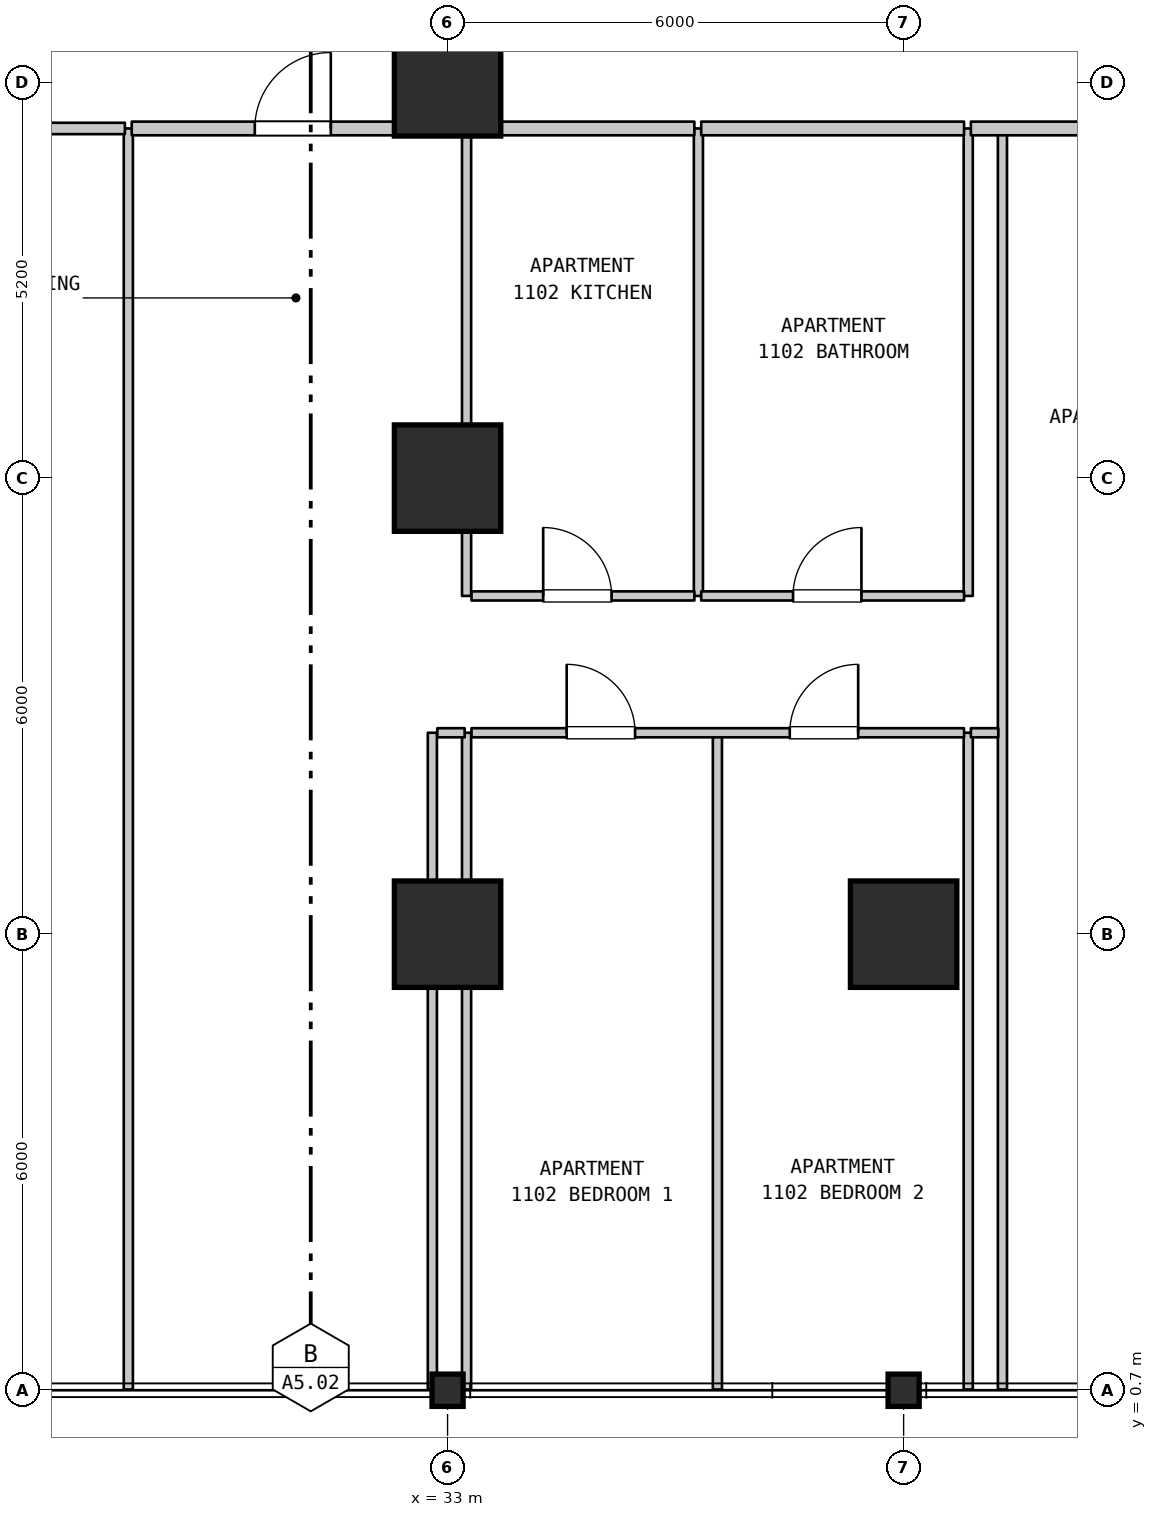
"""IFC4 building model, lengths in metres.
Left out: names, types, materials, properties, quantities, classifications, styles, units other than length and angle.
Written with IfcOpenShell. Run it as: python <this file> out.ifc"""

import sys

from ifc_helpers import new_model, si_unit, direction, frame, frame_2d, origin, origin_2d, place, context, subcontext, project, spatial, rectangle, i_section, extrude, element, fill, save


model = new_model("IFC4")
c1 = context("Model", 3, precision=1e-05, world=origin(), true_north=direction((0.0, 1.0)))
c2 = subcontext(c1, "Body", "Model", "MODEL_VIEW")
j1 = project(units=[si_unit("LENGTHUNIT", "METRE"), si_unit("PLANEANGLEUNIT", "RADIAN")], contexts=[c1])
p1 = place(None, origin())
s1 = spatial("IfcSite", under=j1, at=p1, CompositionType="ELEMENT")
p2 = place(p1, origin())
s2 = spatial("IfcBuilding", under=s1, at=p2, CompositionType="ELEMENT")
p3 = place(p2, frame((0.0, 0.0, 49.9)))
s3 = spatial("IfcBuildingStorey", under=s2, at=p3, CompositionType="ELEMENT", Elevation=49.9)
p4 = place(p3, frame((33.0, 0.7, 0.0), z_axis=(0.0, 0.0, 1.0), x_axis=(1.0, 0.0, 0.0)))
e1 = element("IfcColumn", 1, at=p4, inside=s3, PredefinedType="COLUMN", context=c2, shape_type="SweptSolid", body=[
    extrude(i_section(OverallWidth=0.409, OverallDepth=0.425, WebThickness=0.032, FlangeThickness=0.052, FilletRadius=0.015, at=origin_2d()), origin(), (0.0, 0.0, 1.0), 3.7),
])
for number, where, z_axis, x_axis in (
    (2, (33.0, 6.7, 0.0), (0.0, 0.0, 1.0), (1.0, 0.0, 0.0)),
    (3, (33.0, 12.7, 0.0), (0.0, 0.0, 1.0), (1.0, 0.0, 0.0)),
    (4, (33.0, 17.9, 0.0), (0.0, 0.0, 1.0), (1.0, 0.0, 0.0)),
):
    element("IfcColumn", number, at=place(p3, frame(where, z_axis=z_axis, x_axis=x_axis)), inside=s3, PredefinedType="COLUMN", context=c2, shape_type="SweptSolid", body=[
        extrude(rectangle(XDim=1.4, YDim=1.4, at=origin_2d()), origin(), (0.0, 0.0, 1.0), 3.7),
    ])
p5 = place(p3, frame((39.0, 0.7, 0.0), z_axis=(0.0, 0.0, 1.0), x_axis=(1.0, 0.0, 0.0)))
e5 = element("IfcColumn", 5, at=p5, inside=s3, PredefinedType="COLUMN", context=c2, shape_type="SweptSolid", body=[
    extrude(i_section(OverallWidth=0.409, OverallDepth=0.425, WebThickness=0.032, FlangeThickness=0.052, FilletRadius=0.015, at=origin_2d()), origin(), (0.0, 0.0, 1.0), 3.7),
])
p6 = place(p3, frame((39.0, 6.7, 0.0), z_axis=(0.0, 0.0, 1.0), x_axis=(1.0, 0.0, 0.0)))
e6 = element("IfcColumn", 6, at=p6, inside=s3, PredefinedType="COLUMN", context=c2, shape_type="SweptSolid", body=[
    extrude(rectangle(XDim=1.4, YDim=1.4, at=origin_2d()), origin(), (0.0, 0.0, 1.0), 3.7),
])
p7 = place(p3, frame((28.8, 0.71, 0.0), z_axis=(0.0, 0.0, 1.0), x_axis=(0.0, 1.0, 0.0)))
e7 = element("IfcWall", 7, at=p7, inside=s3, PredefinedType="PARTITIONING", context=c2, shape_type="SweptSolid", body=[
    extrude(rectangle(XDim=16.59, YDim=0.12, at=frame_2d((8.295, 0.0))), origin(), (0.0, 0.0, 1.0), 3.385),
])
for number, where, z_axis, x_axis in (
    (8, (32.8, 0.71, 0.0), (0.0, 0.0, 1.0), (0.0, 1.0, 0.0)),
    (9, (33.25, 0.71, 0.0), (0.0, 0.0, 1.0), (0.0, 1.0, 0.0)),
):
    element("IfcWall", number, at=place(p3, frame(where, z_axis=z_axis, x_axis=x_axis)), inside=s3, PredefinedType="PARTITIONING", context=c2, shape_type="SweptSolid", body=[
        extrude(rectangle(XDim=8.64, YDim=0.12, at=frame_2d((4.32, 0.0))), origin(), (0.0, 0.0, 1.0), 3.385),
    ])
for number, where, z_axis, x_axis in (
    (10, (33.25, 11.15, 0.0), (0.0, 0.0, 1.0), (0.0, 1.0, 0.0)),
    (11, (36.3, 11.15, 0.0), (0.0, 0.0, 1.0), (0.0, 1.0, 0.0)),
):
    element("IfcWall", number, at=place(p3, frame(where, z_axis=z_axis, x_axis=x_axis)), inside=s3, PredefinedType="PARTITIONING", context=c2, shape_type="SweptSolid", body=[
        extrude(rectangle(XDim=6.15, YDim=0.12, at=frame_2d((3.075, 0.0))), origin(), (0.0, 0.0, 1.0), 3.385),
    ])
for number, where, z_axis, x_axis in (
    (12, (36.55, 0.71, 0.0), (0.0, 0.0, 1.0), (0.0, 1.0, 0.0)),
    (13, (39.85, 0.71, 0.0), (0.0, 0.0, 1.0), (0.0, 1.0, 0.0)),
):
    element("IfcWall", number, at=place(p3, frame(where, z_axis=z_axis, x_axis=x_axis)), inside=s3, PredefinedType="PARTITIONING", context=c2, shape_type="SweptSolid", body=[
        extrude(rectangle(XDim=8.64, YDim=0.12, at=frame_2d((4.32, 0.0))), origin(), (0.0, 0.0, 1.0), 3.385),
    ])
p8 = place(p3, frame((39.85, 11.15, 0.0), z_axis=(0.0, 0.0, 1.0), x_axis=(0.0, 1.0, 0.0)))
e14 = element("IfcWall", 14, at=p8, inside=s3, PredefinedType="PARTITIONING", context=c2, shape_type="SweptSolid", body=[
    extrude(rectangle(XDim=6.15, YDim=0.12, at=frame_2d((3.075, 0.0))), origin(), (0.0, 0.0, 1.0), 3.385),
])
p9 = place(p3, frame((40.3, 0.71, 0.0), z_axis=(0.0, 0.0, 1.0), x_axis=(0.0, 1.0, 0.0)))
e15 = element("IfcWall", 15, at=p9, inside=s3, PredefinedType="PARTITIONING", context=c2, shape_type="SweptSolid", body=[
    extrude(rectangle(XDim=16.59, YDim=0.12, at=frame_2d((8.295, 0.0))), origin(), (0.0, 0.0, 1.0), 3.385),
])
p10 = place(p3, frame((32.865, 9.35, 0.0), z_axis=(0.0, 0.0, 1.0), x_axis=(1.0, 0.0, 0.0)))
e16 = element("IfcWall", 16, at=p10, inside=s3, PredefinedType="PARTITIONING", context=c2, shape_type="SweptSolid", body=[
    extrude(rectangle(XDim=0.36, YDim=0.12, at=frame_2d((0.18, 0.0))), origin(), (0.0, 0.0, 1.0), 3.385),
])
p11 = place(p3, frame((33.315, 9.35, 0.0), z_axis=(0.0, 0.0, 1.0), x_axis=(1.0, 0.0, 0.0)))
e17 = element("IfcWall", 17, at=p11, inside=s3, PredefinedType="PARTITIONING", context=c2, shape_type="SweptSolid", body=[
    extrude(rectangle(XDim=6.48, YDim=0.12, at=frame_2d((3.24, 0.0))), origin(), (0.0, 0.0, 1.0), 3.385),
])
p12 = place(p11, frame((1.252, 0.0, 0.0)))
e18 = element("IfcOpeningElement", 18, at=p12, cuts=e17, PredefinedType="OPENING", context=c2, shape_type="SweptSolid", body=[
    extrude(rectangle(XDim=0.9, YDim=2.15, at=frame_2d((0.45, 1.075))), frame((0.0, 0.07, 0.0), z_axis=(0.0, -1.0, 0.0), x_axis=(1.0, 0.0, 0.0)), (0.0, 0.0, 1.0), 0.14),
])
p13 = place(p11, frame((4.187, 0.0, 0.0)))
e19 = element("IfcOpeningElement", 19, at=p13, cuts=e17, PredefinedType="OPENING", context=c2, shape_type="SweptSolid", body=[
    extrude(rectangle(XDim=0.9, YDim=2.15, at=frame_2d((0.45, 1.075))), frame((0.0, 0.07, 0.0), z_axis=(0.0, -1.0, 0.0), x_axis=(1.0, 0.0, 0.0)), (0.0, 0.0, 1.0), 0.14),
])
p14 = place(p3, frame((39.885, 9.35, 0.0), z_axis=(0.0, 0.0, 1.0), x_axis=(1.0, 0.0, 0.0)))
e20 = element("IfcWall", 20, at=p14, inside=s3, PredefinedType="PARTITIONING", context=c2, shape_type="SweptSolid", body=[
    extrude(rectangle(XDim=0.36, YDim=0.12, at=frame_2d((0.18, 0.0))), origin(), (0.0, 0.0, 1.0), 3.385),
])
p15 = place(p3, frame((33.315, 11.15, 0.0), z_axis=(0.0, 0.0, 1.0), x_axis=(1.0, 0.0, 0.0)))
e21 = element("IfcWall", 21, at=p15, inside=s3, PredefinedType="PARTITIONING", context=c2, shape_type="SweptSolid", body=[
    extrude(rectangle(XDim=2.932, YDim=0.12, at=frame_2d((1.466, 0.0))), origin(), (0.0, 0.0, 1.0), 3.385),
])
p16 = place(p15, frame((0.943, 0.0, 0.0)))
e22 = element("IfcOpeningElement", 22, at=p16, cuts=e21, PredefinedType="OPENING", context=c2, shape_type="SweptSolid", body=[
    extrude(rectangle(XDim=0.9, YDim=2.15, at=frame_2d((0.45, 1.075))), frame((0.0, 0.07, 0.0), z_axis=(0.0, -1.0, 0.0), x_axis=(1.0, 0.0, 0.0)), (0.0, 0.0, 1.0), 0.14),
])
p17 = place(p3, frame((36.337, 11.15, 0.0), z_axis=(0.0, 0.0, 1.0), x_axis=(1.0, 0.0, 0.0)))
e23 = element("IfcWall", 23, at=p17, inside=s3, PredefinedType="PARTITIONING", context=c2, shape_type="SweptSolid", body=[
    extrude(rectangle(XDim=3.458, YDim=0.12, at=frame_2d((1.729, 0.0))), origin(), (0.0, 0.0, 1.0), 3.385),
])
p18 = place(p17, frame((1.208, 0.0, 0.0)))
e24 = element("IfcOpeningElement", 24, at=p18, cuts=e23, PredefinedType="OPENING", context=c2, shape_type="SweptSolid", body=[
    extrude(rectangle(XDim=0.9, YDim=2.1, at=frame_2d((0.45, 1.05))), frame((0.0, 0.07, 0.0), z_axis=(0.0, -1.0, 0.0), x_axis=(1.0, 0.0, 0.0)), (0.0, 0.0, 1.0), 0.14),
])
p19 = place(p3, frame((24.545, 17.3, 0.0), z_axis=(0.0, 0.0, 1.0), x_axis=(1.0, 0.0, 0.0)))
e25 = element("IfcWall", 25, at=p19, inside=s3, PredefinedType="STANDARD", context=c2, shape_type="SweptSolid", body=[
    extrude(rectangle(XDim=4.21, YDim=0.15, at=frame_2d((2.105, 0.0))), origin(), (0.0, 0.0, 1.0), 3.385),
])
p20 = place(p19, frame((1.605, 0.0, 0.0)))
e26 = element("IfcOpeningElement", 26, at=p20, cuts=e25, PredefinedType="OPENING", context=c2, shape_type="SweptSolid", body=[
    extrude(rectangle(XDim=1.0, YDim=2.15, at=frame_2d((0.5, 1.075))), frame((0.0, 0.085, 0.0), z_axis=(0.0, -1.0, 0.0), x_axis=(1.0, 0.0, 0.0)), (0.0, 0.0, 1.0), 0.17),
])
p21 = place(p3, frame((28.845, 17.3, 0.0), z_axis=(0.0, 0.0, 1.0), x_axis=(1.0, 0.0, 0.0)))
e27 = element("IfcWall", 27, at=p21, inside=s3, PredefinedType="STANDARD", context=c2, shape_type="SweptSolid", body=[
    extrude(rectangle(XDim=4.38, YDim=0.18, at=frame_2d((2.19, 0.0))), origin(), (0.0, 0.0, 1.0), 3.385),
])
p22 = place(p21, frame((1.619, 0.0, 0.0)))
e28 = element("IfcOpeningElement", 28, at=p22, cuts=e27, PredefinedType="OPENING", context=c2, shape_type="SweptSolid", body=[
    extrude(rectangle(XDim=1.0, YDim=2.15, at=frame_2d((0.5, 1.075))), frame((0.0, 0.1, 0.0), z_axis=(0.0, -1.0, 0.0), x_axis=(1.0, 0.0, 0.0)), (0.0, 0.0, 1.0), 0.2),
])
p23 = place(p3, frame((33.315, 17.3, 0.0), z_axis=(0.0, 0.0, 1.0), x_axis=(1.0, 0.0, 0.0)))
e29 = element("IfcWall", 29, at=p23, inside=s3, PredefinedType="STANDARD", context=c2, shape_type="SweptSolid", body=[
    extrude(rectangle(XDim=2.932, YDim=0.18, at=frame_2d((1.466, 0.0))), origin(), (0.0, 0.0, 1.0), 3.385),
])
p24 = place(p3, frame((36.337, 17.3, 0.0), z_axis=(0.0, 0.0, 1.0), x_axis=(1.0, 0.0, 0.0)))
e30 = element("IfcWall", 30, at=p24, inside=s3, PredefinedType="STANDARD", context=c2, shape_type="SweptSolid", body=[
    extrude(rectangle(XDim=3.458, YDim=0.18, at=frame_2d((1.729, 0.0))), origin(), (0.0, 0.0, 1.0), 3.385),
])
p25 = place(p3, frame((39.885, 17.3, 0.0), z_axis=(0.0, 0.0, 1.0), x_axis=(1.0, 0.0, 0.0)))
e31 = element("IfcWall", 31, at=p25, inside=s3, PredefinedType="STANDARD", context=c2, shape_type="SweptSolid", body=[
    extrude(rectangle(XDim=4.83, YDim=0.18, at=frame_2d((2.415, 0.0))), origin(), (0.0, 0.0, 1.0), 3.385),
])
p26 = place(p25, frame((2.043, 0.0, 0.0)))
e32 = element("IfcOpeningElement", 32, at=p26, cuts=e31, PredefinedType="OPENING", context=c2, shape_type="SweptSolid", body=[
    extrude(rectangle(XDim=1.0, YDim=2.15, at=frame_2d((0.5, 1.075))), frame((0.0, 0.1, 0.0), z_axis=(0.0, -1.0, 0.0), x_axis=(1.0, 0.0, 0.0)), (0.0, 0.0, 1.0), 0.2),
])
p27 = place(p12, origin())
e33 = element("IfcDoor", 33, at=p27, inside=s3, OperationType="SINGLE_SWING_LEFT", PredefinedType="DOOR", context=c2, shape_type="SweptSolid", body=[
    extrude(rectangle(XDim=0.9, YDim=2.15, at=frame_2d((0.45, 1.075))), frame((0.0, 0.025, 0.0), z_axis=(0.0, -1.0, 0.0), x_axis=(1.0, 0.0, 0.0)), (0.0, 0.0, 1.0), 0.05),
])
fill(e18, e33)
p28 = place(p13, origin())
e34 = element("IfcDoor", 34, at=p28, inside=s3, OperationType="SINGLE_SWING_RIGHT", PredefinedType="DOOR", context=c2, shape_type="SweptSolid", body=[
    extrude(rectangle(XDim=0.9, YDim=2.15, at=frame_2d((0.45, 1.075))), frame((0.0, 0.025, 0.0), z_axis=(0.0, -1.0, 0.0), x_axis=(1.0, 0.0, 0.0)), (0.0, 0.0, 1.0), 0.05),
])
fill(e19, e34)
p29 = place(p16, origin())
e35 = element("IfcDoor", 35, at=p29, inside=s3, OperationType="SINGLE_SWING_LEFT", PredefinedType="DOOR", context=c2, shape_type="SweptSolid", body=[
    extrude(rectangle(XDim=0.9, YDim=2.15, at=frame_2d((0.45, 1.075))), frame((0.0, 0.025, 0.0), z_axis=(0.0, -1.0, 0.0), x_axis=(1.0, 0.0, 0.0)), (0.0, 0.0, 1.0), 0.05),
])
fill(e22, e35)
p30 = place(p18, origin())
e36 = element("IfcDoor", 36, at=p30, inside=s3, OperationType="SINGLE_SWING_RIGHT", PredefinedType="DOOR", context=c2, shape_type="SweptSolid", body=[
    extrude(rectangle(XDim=0.9, YDim=2.1, at=frame_2d((0.45, 1.05))), frame((0.0, 0.025, 0.0), z_axis=(0.0, -1.0, 0.0), x_axis=(1.0, 0.0, 0.0)), (0.0, 0.0, 1.0), 0.05),
])
fill(e24, e36)
p31 = place(p22, origin())
e37 = element("IfcDoor", 37, at=p31, inside=s3, OperationType="SINGLE_SWING_RIGHT", PredefinedType="DOOR", context=c2, shape_type="SweptSolid", body=[
    extrude(rectangle(XDim=1.0, YDim=2.15, at=frame_2d((0.5, 1.075))), frame((0.0, 0.025, 0.0), z_axis=(0.0, -1.0, 0.0), x_axis=(1.0, 0.0, 0.0)), (0.0, 0.0, 1.0), 0.05),
])
fill(e28, e37)
save(model, sys.argv[1])
